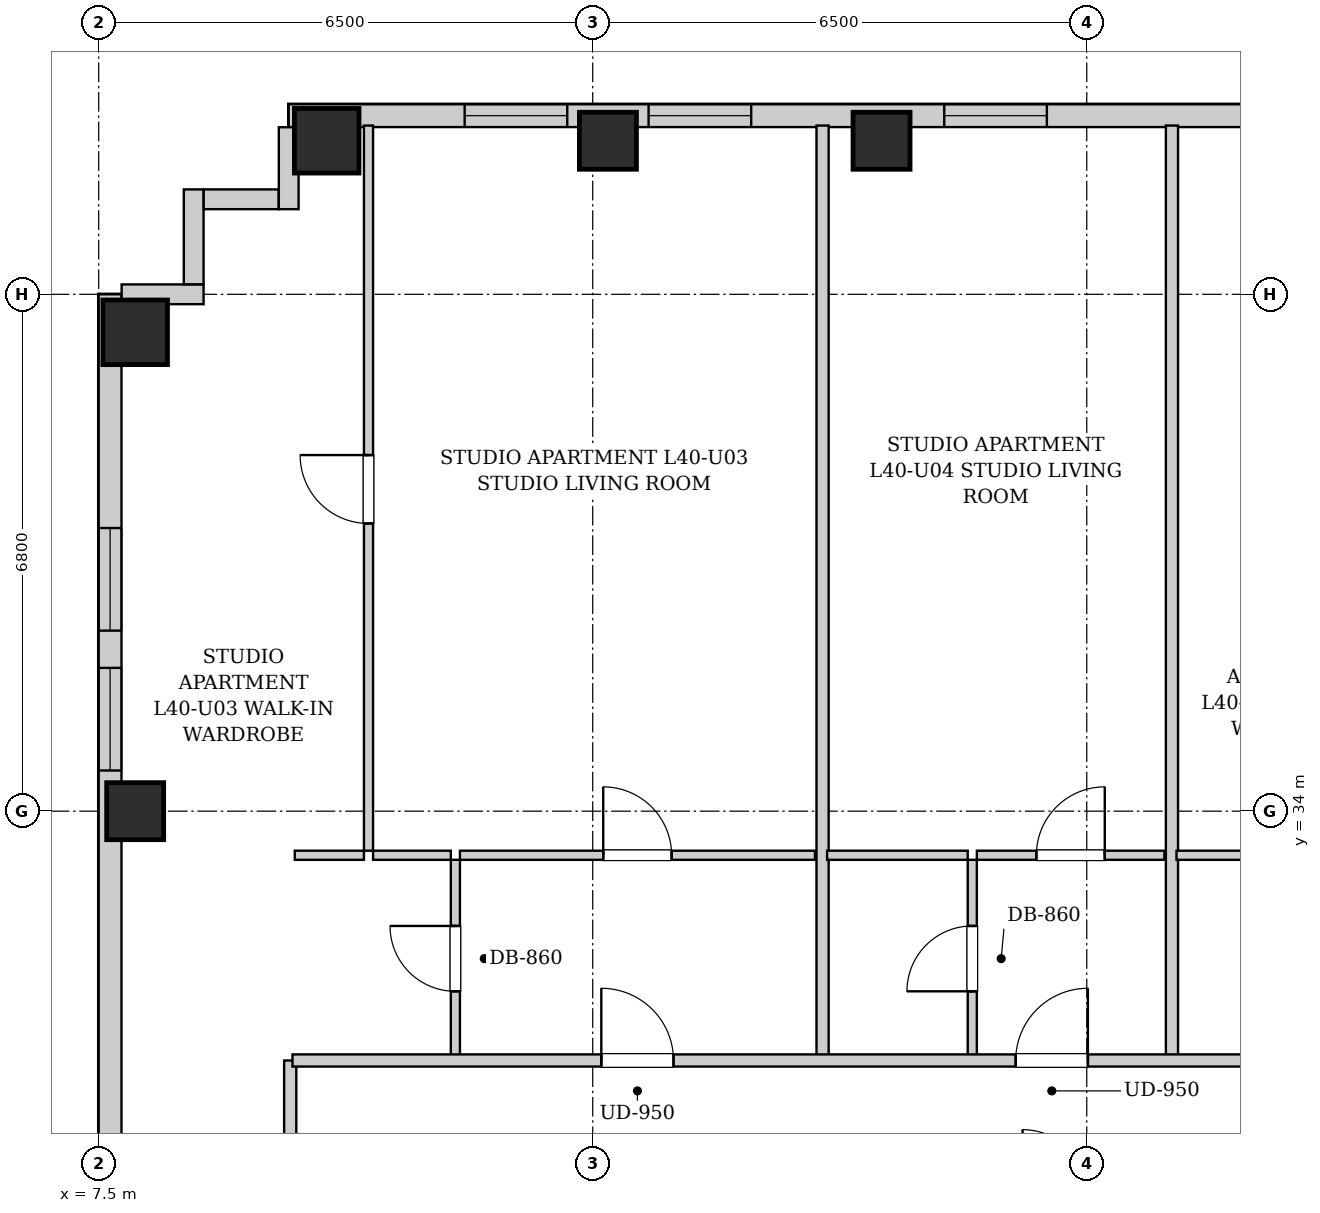
"""IFC4 building model, lengths in metres.
Left out: names, types, materials, properties, quantities, classifications, styles, units other than length and angle.
Written with IfcOpenShell. Run it as: python <this file> out.ifc"""

import sys

from ifc_helpers import new_model, si_unit, direction, frame, frame_2d, origin, origin_2d, place, context, subcontext, project, spatial, rectangle, extrude, element, fill, save


model = new_model("IFC4")
c1 = context("Model", 3, precision=1e-05, world=origin(), true_north=direction((0.0, 1.0)))
c2 = subcontext(c1, "Body", "Model", "MODEL_VIEW")
j1 = project(units=[si_unit("LENGTHUNIT", "METRE"), si_unit("PLANEANGLEUNIT", "RADIAN")], contexts=[c1])
p1 = place(None, origin())
s1 = spatial("IfcSite", under=j1, at=p1, CompositionType="ELEMENT")
p2 = place(p1, origin())
s2 = spatial("IfcBuilding", under=s1, at=p2, CompositionType="ELEMENT")
p3 = place(p2, frame((0.0, 0.0, 140.65)))
s3 = spatial("IfcBuildingStorey", under=s2, at=p3, CompositionType="ELEMENT", Elevation=140.65)
p4 = place(p3, frame((10.5, 42.82, 0.0), z_axis=(0.0, 0.0, 1.0), x_axis=(1.0, 0.0, 0.0)))
e1 = element("IfcColumn", 1, at=p4, inside=s3, PredefinedType="COLUMN", context=c2, shape_type="SweptSolid", body=[
    extrude(rectangle(XDim=0.85, YDim=0.85, at=origin_2d()), origin(), (0.0, 0.0, 1.0), 3.25),
])
for number, where, z_axis, x_axis in (
    (2, (14.2, 42.82, 0.0), (0.0, 0.0, 1.0), (1.0, 0.0, 0.0)),
    (3, (17.8, 42.82, 0.0), (0.0, 0.0, 1.0), (1.0, 0.0, 0.0)),
    (4, (7.98, 34.0, 0.0), (0.0, 0.0, 1.0), (1.0, 0.0, 0.0)),
):
    element("IfcColumn", number, at=place(p3, frame(where, z_axis=z_axis, x_axis=x_axis)), inside=s3, PredefinedType="COLUMN", context=c2, shape_type="SweptSolid", body=[
        extrude(rectangle(XDim=0.75, YDim=0.75, at=origin_2d()), origin(), (0.0, 0.0, 1.0), 3.25),
    ])
p5 = place(p3, frame((7.98, 40.3, 0.0), z_axis=(0.0, 0.0, 1.0), x_axis=(1.0, 0.0, 0.0)))
e5 = element("IfcColumn", 5, at=p5, inside=s3, PredefinedType="COLUMN", context=c2, shape_type="SweptSolid", body=[
    extrude(rectangle(XDim=0.85, YDim=0.85, at=origin_2d()), origin(), (0.0, 0.0, 1.0), 3.25),
])
p6 = place(p3, frame((10.0, 43.15, 0.0), z_axis=(0.0, 0.0, 1.0), x_axis=(1.0, 0.0, 0.0)))
e6 = element("IfcWall", 6, at=p6, inside=s3, PredefinedType="SOLIDWALL", context=c2, shape_type="SweptSolid", body=[
    extrude(rectangle(XDim=19.5, YDim=0.3, at=frame_2d((9.75, 0.0))), origin(), (0.0, 0.0, 1.0), 2.99),
])
p7 = place(p6, frame((2.315, 0.0, 0.55)))
e7 = element("IfcOpeningElement", 7, at=p7, cuts=e6, PredefinedType="OPENING", context=c2, shape_type="SweptSolid", body=[
    extrude(rectangle(XDim=1.35, YDim=1.2, at=frame_2d((0.675, 0.6))), frame((0.0, 0.16, 0.0), z_axis=(0.0, -1.0, 0.0), x_axis=(1.0, 0.0, 0.0)), (0.0, 0.0, 1.0), 0.32),
])
p8 = place(p6, frame((4.735, 0.0, 0.55)))
e8 = element("IfcOpeningElement", 8, at=p8, cuts=e6, PredefinedType="OPENING", context=c2, shape_type="SweptSolid", body=[
    extrude(rectangle(XDim=1.35, YDim=1.2, at=frame_2d((0.675, 0.6))), frame((0.0, 0.16, 0.0), z_axis=(0.0, -1.0, 0.0), x_axis=(1.0, 0.0, 0.0)), (0.0, 0.0, 1.0), 0.32),
])
p9 = place(p6, frame((8.625, 0.0, 0.55)))
e9 = element("IfcOpeningElement", 9, at=p9, cuts=e6, PredefinedType="OPENING", context=c2, shape_type="SweptSolid", body=[
    extrude(rectangle(XDim=1.35, YDim=1.2, at=frame_2d((0.675, 0.6))), frame((0.0, 0.16, 0.0), z_axis=(0.0, -1.0, 0.0), x_axis=(1.0, 0.0, 0.0)), (0.0, 0.0, 1.0), 0.32),
])
p10 = place(p6, frame((17.5, 0.0, 0.55)))
e10 = element("IfcOpeningElement", 10, at=p10, cuts=e6, PredefinedType="OPENING", context=c2, shape_type="SweptSolid", body=[
    extrude(rectangle(XDim=1.35, YDim=1.2, at=frame_2d((0.675, 0.6))), frame((0.0, 0.16, 0.0), z_axis=(0.0, -1.0, 0.0), x_axis=(1.0, 0.0, 0.0)), (0.0, 0.0, 1.0), 0.32),
])
p11 = place(p3, frame((7.65, 6.3, 0.0), z_axis=(0.0, 0.0, 1.0), x_axis=(0.0, 1.0, 0.0)))
e11 = element("IfcWall", 11, at=p11, inside=s3, PredefinedType="SOLIDWALL", context=c2, shape_type="SweptSolid", body=[
    extrude(rectangle(XDim=34.5, YDim=0.3, at=frame_2d((17.25, 0.0))), origin(), (0.0, 0.0, 1.0), 2.99),
])
p12 = place(p11, frame((1.575, 0.0, 0.55)))
e12 = element("IfcOpeningElement", 12, at=p12, cuts=e11, PredefinedType="OPENING", context=c2, shape_type="SweptSolid", body=[
    extrude(rectangle(XDim=1.35, YDim=1.2, at=frame_2d((0.675, 0.6))), frame((0.0, 0.16, 0.0), z_axis=(0.0, -1.0, 0.0), x_axis=(1.0, 0.0, 0.0)), (0.0, 0.0, 1.0), 0.32),
])
p13 = place(p11, frame((30.075, 0.0, 0.55)))
e13 = element("IfcOpeningElement", 13, at=p13, cuts=e11, PredefinedType="OPENING", context=c2, shape_type="SweptSolid", body=[
    extrude(rectangle(XDim=1.35, YDim=1.2, at=frame_2d((0.675, 0.6))), frame((0.0, 0.16, 0.0), z_axis=(0.0, -1.0, 0.0), x_axis=(1.0, 0.0, 0.0)), (0.0, 0.0, 1.0), 0.32),
])
p14 = place(p11, frame((28.235, 0.0, 0.55)))
e14 = element("IfcOpeningElement", 14, at=p14, cuts=e11, PredefinedType="OPENING", context=c2, shape_type="SweptSolid", body=[
    extrude(rectangle(XDim=1.35, YDim=1.2, at=frame_2d((0.675, 0.6))), frame((0.0, 0.16, 0.0), z_axis=(0.0, -1.0, 0.0), x_axis=(1.0, 0.0, 0.0)), (0.0, 0.0, 1.0), 0.32),
])
p15 = place(p11, frame((11.175, 0.0, 0.55)))
e15 = element("IfcOpeningElement", 15, at=p15, cuts=e11, PredefinedType="OPENING", context=c2, shape_type="SweptSolid", body=[
    extrude(rectangle(XDim=1.35, YDim=1.2, at=frame_2d((0.675, 0.6))), frame((0.0, 0.16, 0.0), z_axis=(0.0, -1.0, 0.0), x_axis=(1.0, 0.0, 0.0)), (0.0, 0.0, 1.0), 0.32),
])
p16 = place(p11, frame((9.235, 0.0, 0.55)))
e16 = element("IfcOpeningElement", 16, at=p16, cuts=e11, PredefinedType="OPENING", context=c2, shape_type="SweptSolid", body=[
    extrude(rectangle(XDim=1.35, YDim=1.2, at=frame_2d((0.675, 0.6))), frame((0.0, 0.16, 0.0), z_axis=(0.0, -1.0, 0.0), x_axis=(1.0, 0.0, 0.0)), (0.0, 0.0, 1.0), 0.32),
])
p17 = place(p11, frame((18.2, 0.0, 0.55)))
e17 = element("IfcOpeningElement", 17, at=p17, cuts=e11, PredefinedType="OPENING", context=c2, shape_type="SweptSolid", body=[
    extrude(rectangle(XDim=1.35, YDim=1.2, at=frame_2d((0.675, 0.6))), frame((0.0, 0.16, 0.0), z_axis=(0.0, -1.0, 0.0), x_axis=(1.0, 0.0, 0.0)), (0.0, 0.0, 1.0), 0.32),
])
p18 = place(p11, frame((19.81, 0.0, 0.55)))
e18 = element("IfcOpeningElement", 18, at=p18, cuts=e11, PredefinedType="OPENING", context=c2, shape_type="SweptSolid", body=[
    extrude(rectangle(XDim=1.35, YDim=1.2, at=frame_2d((0.675, 0.6))), frame((0.0, 0.16, 0.0), z_axis=(0.0, -1.0, 0.0), x_axis=(1.0, 0.0, 0.0)), (0.0, 0.0, 1.0), 0.32),
])
p19 = place(p3, frame((7.802, 40.8, 0.0), z_axis=(0.0, 0.0, 1.0), x_axis=(1.0, 0.0, 0.0)))
e19 = element("IfcWall", 19, at=p19, inside=s3, PredefinedType="SOLIDWALL", context=c2, shape_type="SweptSolid", body=[
    extrude(rectangle(XDim=1.078, YDim=0.26, at=frame_2d((0.539, 0.0))), origin(), (0.0, 0.0, 1.0), 2.99),
])
p20 = place(p3, frame((8.75, 40.932, 0.0), z_axis=(0.0, 0.0, 1.0), x_axis=(0.0, 1.0, 0.0)))
e20 = element("IfcWall", 20, at=p20, inside=s3, PredefinedType="SOLIDWALL", context=c2, shape_type="SweptSolid", body=[
    extrude(rectangle(XDim=1.248, YDim=0.26, at=frame_2d((0.624, 0.0))), origin(), (0.0, 0.0, 1.0), 2.99),
])
p21 = place(p3, frame((8.882, 42.05, 0.0), z_axis=(0.0, 0.0, 1.0), x_axis=(1.0, 0.0, 0.0)))
e21 = element("IfcWall", 21, at=p21, inside=s3, PredefinedType="SOLIDWALL", context=c2, shape_type="SweptSolid", body=[
    extrude(rectangle(XDim=0.986, YDim=0.26, at=frame_2d((0.493, 0.0))), origin(), (0.0, 0.0, 1.0), 2.99),
])
p22 = place(p3, frame((10.0, 41.92, 0.0), z_axis=(0.0, 0.0, 1.0), x_axis=(0.0, 1.0, 0.0)))
e22 = element("IfcWall", 22, at=p22, inside=s3, PredefinedType="SOLIDWALL", context=c2, shape_type="SweptSolid", body=[
    extrude(rectangle(XDim=1.078, YDim=0.26, at=frame_2d((0.539, 0.0))), origin(), (0.0, 0.0, 1.0), 2.99),
])
p23 = place(p3, frame((10.02, 28.98, 0.0), z_axis=(0.0, 0.0, 1.0), x_axis=(0.0, 1.0, 0.0)))
e23 = element("IfcWall", 23, at=p23, inside=s3, PredefinedType="PARTITIONING", context=c2, shape_type="SweptSolid", body=[
    extrude(rectangle(XDim=1.74, YDim=0.16, at=frame_2d((0.87, 0.0))), origin(), (0.0, 0.0, 1.0), 2.99),
])
p24 = place(p3, frame((12.193, 30.76, 0.0), z_axis=(0.0, 0.0, 1.0), x_axis=(0.0, 1.0, 0.0)))
e24 = element("IfcWall", 24, at=p24, inside=s3, PredefinedType="PARTITIONING", context=c2, shape_type="SweptSolid", body=[
    extrude(rectangle(XDim=2.6, YDim=0.12, at=frame_2d((1.3, 0.0))), origin(), (0.0, 0.0, 1.0), 2.99),
])
p25 = place(p24, frame((0.87, 0.0, 0.0)))
e25 = element("IfcOpeningElement", 25, at=p25, cuts=e24, PredefinedType="OPENING", context=c2, shape_type="SweptSolid", body=[
    extrude(rectangle(XDim=0.86, YDim=2.05, at=frame_2d((0.43, 1.025))), frame((0.0, 0.07, 0.0), z_axis=(0.0, -1.0, 0.0), x_axis=(1.0, 0.0, 0.0)), (0.0, 0.0, 1.0), 0.14),
])
p26 = place(p3, frame((10.08, 33.42, 0.0), z_axis=(0.0, 0.0, 1.0), x_axis=(1.0, 0.0, 0.0)))
e26 = element("IfcWall", 26, at=p26, inside=s3, PredefinedType="PARTITIONING", context=c2, shape_type="SweptSolid", body=[
    extrude(rectangle(XDim=0.91, YDim=0.12, at=frame_2d((0.455, 0.0))), origin(), (0.0, 0.0, 1.0), 2.99),
])
p27 = place(p3, frame((11.11, 33.42, 0.0), z_axis=(0.0, 0.0, 1.0), x_axis=(1.0, 0.0, 0.0)))
e27 = element("IfcWall", 27, at=p27, inside=s3, PredefinedType="PARTITIONING", context=c2, shape_type="SweptSolid", body=[
    extrude(rectangle(XDim=1.023, YDim=0.12, at=frame_2d((0.511, 0.0))), origin(), (0.0, 0.0, 1.0), 2.99),
])
p28 = place(p3, frame((12.253, 33.42, 0.0), z_axis=(0.0, 0.0, 1.0), x_axis=(1.0, 0.0, 0.0)))
e28 = element("IfcWall", 28, at=p28, inside=s3, PredefinedType="PARTITIONING", context=c2, shape_type="SweptSolid", body=[
    extrude(rectangle(XDim=4.671, YDim=0.12, at=frame_2d((2.335, 0.0))), origin(), (0.0, 0.0, 1.0), 2.99),
])
p29 = place(p28, frame((1.885, 0.0, 0.0)))
e29 = element("IfcOpeningElement", 29, at=p29, cuts=e28, PredefinedType="OPENING", context=c2, shape_type="SweptSolid", body=[
    extrude(rectangle(XDim=0.9, YDim=2.05, at=frame_2d((0.45, 1.025))), frame((0.0, 0.07, 0.0), z_axis=(0.0, -1.0, 0.0), x_axis=(1.0, 0.0, 0.0)), (0.0, 0.0, 1.0), 0.14),
])
p30 = place(p3, frame((11.05, 33.48, 0.0), z_axis=(0.0, 0.0, 1.0), x_axis=(0.0, 1.0, 0.0)))
e30 = element("IfcWall", 30, at=p30, inside=s3, PredefinedType="PARTITIONING", context=c2, shape_type="SweptSolid", body=[
    extrude(rectangle(XDim=9.54, YDim=0.12, at=frame_2d((4.77, 0.0))), origin(), (0.0, 0.0, 1.0), 2.99),
])
p31 = place(p30, frame((4.305, 0.0, 0.0)))
e31 = element("IfcOpeningElement", 31, at=p31, cuts=e30, PredefinedType="OPENING", context=c2, shape_type="SweptSolid", body=[
    extrude(rectangle(XDim=0.9, YDim=2.05, at=frame_2d((0.45, 1.025))), frame((0.0, 0.07, 0.0), z_axis=(0.0, -1.0, 0.0), x_axis=(1.0, 0.0, 0.0)), (0.0, 0.0, 1.0), 0.14),
])
p32 = place(p3, frame((17.024, 30.76, 0.0), z_axis=(0.0, 0.0, 1.0), x_axis=(0.0, 1.0, 0.0)))
e32 = element("IfcWall", 32, at=p32, inside=s3, PredefinedType="PARTITIONING", context=c2, shape_type="SweptSolid", body=[
    extrude(rectangle(XDim=12.26, YDim=0.16, at=frame_2d((6.13, 0.0))), origin(), (0.0, 0.0, 1.0), 2.99),
])
p33 = place(p3, frame((18.994, 30.76, 0.0), z_axis=(0.0, 0.0, 1.0), x_axis=(0.0, 1.0, 0.0)))
e33 = element("IfcWall", 33, at=p33, inside=s3, PredefinedType="PARTITIONING", context=c2, shape_type="SweptSolid", body=[
    extrude(rectangle(XDim=2.6, YDim=0.12, at=frame_2d((1.3, 0.0))), origin(), (0.0, 0.0, 1.0), 2.99),
])
p34 = place(p33, frame((0.87, 0.0, 0.0)))
e34 = element("IfcOpeningElement", 34, at=p34, cuts=e33, PredefinedType="OPENING", context=c2, shape_type="SweptSolid", body=[
    extrude(rectangle(XDim=0.86, YDim=2.05, at=frame_2d((0.43, 1.025))), frame((0.0, 0.07, 0.0), z_axis=(0.0, -1.0, 0.0), x_axis=(1.0, 0.0, 0.0)), (0.0, 0.0, 1.0), 0.14),
])
p35 = place(p3, frame((17.084, 33.42, 0.0), z_axis=(0.0, 0.0, 1.0), x_axis=(1.0, 0.0, 0.0)))
e35 = element("IfcWall", 35, at=p35, inside=s3, PredefinedType="PARTITIONING", context=c2, shape_type="SweptSolid", body=[
    extrude(rectangle(XDim=1.85, YDim=0.12, at=frame_2d((0.925, 0.0))), origin(), (0.0, 0.0, 1.0), 2.99),
])
p36 = place(p3, frame((19.054, 33.42, 0.0), z_axis=(0.0, 0.0, 1.0), x_axis=(1.0, 0.0, 0.0)))
e36 = element("IfcWall", 36, at=p36, inside=s3, PredefinedType="PARTITIONING", context=c2, shape_type="SweptSolid", body=[
    extrude(rectangle(XDim=2.467, YDim=0.12, at=frame_2d((1.233, 0.0))), origin(), (0.0, 0.0, 1.0), 2.99),
])
p37 = place(p36, frame((0.783, 0.0, 0.0)))
e37 = element("IfcOpeningElement", 37, at=p37, cuts=e36, PredefinedType="OPENING", context=c2, shape_type="SweptSolid", body=[
    extrude(rectangle(XDim=0.9, YDim=2.05, at=frame_2d((0.45, 1.025))), frame((0.0, 0.07, 0.0), z_axis=(0.0, -1.0, 0.0), x_axis=(1.0, 0.0, 0.0)), (0.0, 0.0, 1.0), 0.14),
])
p38 = place(p3, frame((21.621, 30.76, 0.0), z_axis=(0.0, 0.0, 1.0), x_axis=(0.0, 1.0, 0.0)))
e38 = element("IfcWall", 38, at=p38, inside=s3, PredefinedType="PARTITIONING", context=c2, shape_type="SweptSolid", body=[
    extrude(rectangle(XDim=12.26, YDim=0.16, at=frame_2d((6.13, 0.0))), origin(), (0.0, 0.0, 1.0), 2.99),
])
p39 = place(p3, frame((21.681, 33.42, 0.0), z_axis=(0.0, 0.0, 1.0), x_axis=(1.0, 0.0, 0.0)))
e39 = element("IfcWall", 39, at=p39, inside=s3, PredefinedType="PARTITIONING", context=c2, shape_type="SweptSolid", body=[
    extrude(rectangle(XDim=2.4, YDim=0.12, at=frame_2d((1.2, 0.0))), origin(), (0.0, 0.0, 1.0), 2.99),
])
p40 = place(p3, frame((10.05, 30.72, 0.0), z_axis=(0.0, 0.0, 1.0), x_axis=(1.0, 0.0, 0.0)))
e40 = element("IfcWall", 40, at=p40, inside=s3, PredefinedType="PARTITIONING", context=c2, shape_type="SweptSolid", body=[
    extrude(rectangle(XDim=27.7, YDim=0.16, at=frame_2d((13.85, 0.0))), origin(), (0.0, 0.0, 1.0), 2.99),
])
p41 = place(p40, frame((4.063, 0.0, 0.0)))
e41 = element("IfcOpeningElement", 41, at=p41, cuts=e40, PredefinedType="OPENING", context=c2, shape_type="SweptSolid", body=[
    extrude(rectangle(XDim=0.95, YDim=2.1, at=frame_2d((0.475, 1.05))), frame((0.0, 0.09, 0.0), z_axis=(0.0, -1.0, 0.0), x_axis=(1.0, 0.0, 0.0)), (0.0, 0.0, 1.0), 0.18),
])
p42 = place(p40, frame((9.515, 0.0, 0.0)))
e42 = element("IfcOpeningElement", 42, at=p42, cuts=e40, PredefinedType="OPENING", context=c2, shape_type="SweptSolid", body=[
    extrude(rectangle(XDim=0.95, YDim=2.1, at=frame_2d((0.475, 1.05))), frame((0.0, 0.09, 0.0), z_axis=(0.0, -1.0, 0.0), x_axis=(1.0, 0.0, 0.0)), (0.0, 0.0, 1.0), 0.18),
])
p43 = place(p40, frame((15.896, 0.0, 0.0)))
e43 = element("IfcOpeningElement", 43, at=p43, cuts=e40, PredefinedType="OPENING", context=c2, shape_type="SweptSolid", body=[
    extrude(rectangle(XDim=0.95, YDim=2.1, at=frame_2d((0.475, 1.05))), frame((0.0, 0.09, 0.0), z_axis=(0.0, -1.0, 0.0), x_axis=(1.0, 0.0, 0.0)), (0.0, 0.0, 1.0), 0.18),
])
p44 = place(p40, frame((25.925, 0.0, 0.0)))
e44 = element("IfcOpeningElement", 44, at=p44, cuts=e40, PredefinedType="OPENING", context=c2, shape_type="SweptSolid", body=[
    extrude(rectangle(XDim=0.95, YDim=2.1, at=frame_2d((0.475, 1.05))), frame((0.0, 0.09, 0.0), z_axis=(0.0, -1.0, 0.0), x_axis=(1.0, 0.0, 0.0)), (0.0, 0.0, 1.0), 0.18),
])
p45 = place(p25, origin())
e45 = element("IfcDoor", 45, at=p45, inside=s3, OperationType="SINGLE_SWING_RIGHT", PredefinedType="DOOR", context=c2, shape_type="SweptSolid", body=[
    extrude(rectangle(XDim=0.86, YDim=2.05, at=frame_2d((0.43, 1.025))), frame((0.0, 0.025, 0.0), z_axis=(0.0, -1.0, 0.0), x_axis=(1.0, 0.0, 0.0)), (0.0, 0.0, 1.0), 0.05),
])
fill(e25, e45)
p46 = place(p29, origin())
e46 = element("IfcDoor", 46, at=p46, inside=s3, OperationType="SINGLE_SWING_LEFT", PredefinedType="DOOR", context=c2, shape_type="SweptSolid", body=[
    extrude(rectangle(XDim=0.9, YDim=2.05, at=frame_2d((0.45, 1.025))), frame((0.0, 0.025, 0.0), z_axis=(0.0, -1.0, 0.0), x_axis=(1.0, 0.0, 0.0)), (0.0, 0.0, 1.0), 0.05),
])
fill(e29, e46)
p47 = place(p31, origin())
e47 = element("IfcDoor", 47, at=p47, inside=s3, OperationType="SINGLE_SWING_RIGHT", PredefinedType="DOOR", context=c2, shape_type="SweptSolid", body=[
    extrude(rectangle(XDim=0.9, YDim=2.05, at=frame_2d((0.45, 1.025))), frame((0.0, 0.025, 0.0), z_axis=(0.0, -1.0, 0.0), x_axis=(1.0, 0.0, 0.0)), (0.0, 0.0, 1.0), 0.05),
])
fill(e31, e47)
p48 = place(p34, origin())
e48 = element("IfcDoor", 48, at=p48, inside=s3, OperationType="SINGLE_SWING_LEFT", PredefinedType="DOOR", context=c2, shape_type="SweptSolid", body=[
    extrude(rectangle(XDim=0.86, YDim=2.05, at=frame_2d((0.43, 1.025))), frame((0.0, 0.025, 0.0), z_axis=(0.0, -1.0, 0.0), x_axis=(1.0, 0.0, 0.0)), (0.0, 0.0, 1.0), 0.05),
])
fill(e34, e48)
p49 = place(p37, origin())
e49 = element("IfcDoor", 49, at=p49, inside=s3, OperationType="SINGLE_SWING_RIGHT", PredefinedType="DOOR", context=c2, shape_type="SweptSolid", body=[
    extrude(rectangle(XDim=0.9, YDim=2.05, at=frame_2d((0.45, 1.025))), frame((0.0, 0.025, 0.0), z_axis=(0.0, -1.0, 0.0), x_axis=(1.0, 0.0, 0.0)), (0.0, 0.0, 1.0), 0.05),
])
fill(e37, e49)
p50 = place(p41, origin())
e50 = element("IfcDoor", 50, at=p50, inside=s3, OperationType="SINGLE_SWING_LEFT", PredefinedType="DOOR", context=c2, shape_type="SweptSolid", body=[
    extrude(rectangle(XDim=0.95, YDim=2.1, at=frame_2d((0.475, 1.05))), frame((0.0, 0.025, 0.0), z_axis=(0.0, -1.0, 0.0), x_axis=(1.0, 0.0, 0.0)), (0.0, 0.0, 1.0), 0.05),
])
fill(e41, e50)
p51 = place(p42, origin())
e51 = element("IfcDoor", 51, at=p51, inside=s3, OperationType="SINGLE_SWING_RIGHT", PredefinedType="DOOR", context=c2, shape_type="SweptSolid", body=[
    extrude(rectangle(XDim=0.95, YDim=2.1, at=frame_2d((0.475, 1.05))), frame((0.0, 0.025, 0.0), z_axis=(0.0, -1.0, 0.0), x_axis=(1.0, 0.0, 0.0)), (0.0, 0.0, 1.0), 0.05),
])
fill(e42, e51)
p52 = place(p13, origin())
e52 = element("IfcWindow", 52, at=p52, inside=s3, PartitioningType="SINGLE_PANEL", PredefinedType="WINDOW", context=c2, shape_type="SweptSolid", body=[
    extrude(rectangle(XDim=1.35, YDim=1.2, at=frame_2d((0.675, 0.6))), frame((0.0, 0.03, 0.0), z_axis=(0.0, -1.0, 0.0), x_axis=(1.0, 0.0, 0.0)), (0.0, 0.0, 1.0), 0.06),
])
fill(e13, e52)
p53 = place(p14, origin())
e53 = element("IfcWindow", 53, at=p53, inside=s3, PartitioningType="SINGLE_PANEL", PredefinedType="WINDOW", context=c2, shape_type="SweptSolid", body=[
    extrude(rectangle(XDim=1.35, YDim=1.2, at=frame_2d((0.675, 0.6))), frame((0.0, 0.03, 0.0), z_axis=(0.0, -1.0, 0.0), x_axis=(1.0, 0.0, 0.0)), (0.0, 0.0, 1.0), 0.06),
])
fill(e14, e53)
p54 = place(p7, origin())
e54 = element("IfcWindow", 54, at=p54, inside=s3, PartitioningType="SINGLE_PANEL", PredefinedType="WINDOW", context=c2, shape_type="SweptSolid", body=[
    extrude(rectangle(XDim=1.35, YDim=1.2, at=frame_2d((0.675, 0.6))), frame((0.0, 0.03, 0.0), z_axis=(0.0, -1.0, 0.0), x_axis=(1.0, 0.0, 0.0)), (0.0, 0.0, 1.0), 0.06),
])
fill(e7, e54)
p55 = place(p8, origin())
e55 = element("IfcWindow", 55, at=p55, inside=s3, PartitioningType="SINGLE_PANEL", PredefinedType="WINDOW", context=c2, shape_type="SweptSolid", body=[
    extrude(rectangle(XDim=1.35, YDim=1.2, at=frame_2d((0.675, 0.6))), frame((0.0, 0.03, 0.0), z_axis=(0.0, -1.0, 0.0), x_axis=(1.0, 0.0, 0.0)), (0.0, 0.0, 1.0), 0.06),
])
fill(e8, e55)
p56 = place(p9, origin())
e56 = element("IfcWindow", 56, at=p56, inside=s3, PartitioningType="SINGLE_PANEL", PredefinedType="WINDOW", context=c2, shape_type="SweptSolid", body=[
    extrude(rectangle(XDim=1.35, YDim=1.2, at=frame_2d((0.675, 0.6))), frame((0.0, 0.03, 0.0), z_axis=(0.0, -1.0, 0.0), x_axis=(1.0, 0.0, 0.0)), (0.0, 0.0, 1.0), 0.06),
])
fill(e9, e56)
save(model, sys.argv[1])
